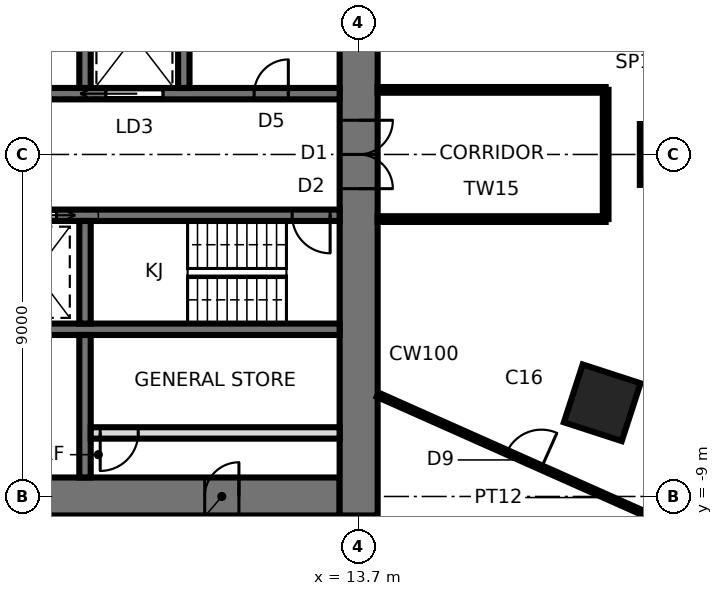
"""IFC4 building model, lengths in metres.
Left out: names, types, materials, properties, quantities, classifications, styles, units other than length and angle.
Written with IfcOpenShell. Run it as: python <this file> out.ifc"""

import sys

from ifc_helpers import new_model, si_unit, direction, frame, frame_2d, origin, origin_2d, place, context, subcontext, project, spatial, rectangle, extrude, element, fill, save


model = new_model("IFC4")
c1 = context("Model", 3, precision=1e-05, world=origin(), true_north=direction((0.0, 1.0)))
c2 = subcontext(c1, "Body", "Model", "MODEL_VIEW")
j1 = project(units=[si_unit("LENGTHUNIT", "METRE"), si_unit("PLANEANGLEUNIT", "RADIAN")], contexts=[c1])
p1 = place(None, origin())
s1 = spatial("IfcSite", under=j1, at=p1, CompositionType="ELEMENT")
p2 = place(p1, origin())
s2 = spatial("IfcBuilding", under=s1, at=p2, CompositionType="ELEMENT")
p3 = place(p2, frame((0.0, 0.0, 154.8)))
s3 = spatial("IfcBuildingStorey", under=s2, at=p3, CompositionType="ELEMENT", Elevation=154.8)
for number, where, z_axis, x_axis in (
    (1, (21.9, 0.0, 0.0), (0.0, 0.0, 1.0), (1.0, 0.0, 0.0)),
    (2, (20.109, -6.534, 0.0), (0.0, 0.0, 1.0), (0.951, -0.309, 0.0)),
):
    element("IfcColumn", number, at=place(p3, frame(where, z_axis=z_axis, x_axis=x_axis)), inside=s3, PredefinedType="COLUMN", context=c2, shape_type="SweptSolid", body=[
        extrude(rectangle(XDim=1.6, YDim=1.6, at=origin_2d()), origin(), (0.0, 0.0, 1.0), 3.9),
    ])
p4 = place(p3, frame((-13.2, -9.0, 0.0), z_axis=(0.0, 0.0, 1.0), x_axis=(1.0, 0.0, 0.0)))
e3 = element("IfcWall", 3, at=p4, inside=s3, PredefinedType="SHEAR", context=c2, shape_type="SweptSolid", body=[
    extrude(rectangle(XDim=26.4, YDim=1.0, at=frame_2d((13.2, 0.0))), origin(), (0.0, 0.0, 1.0), 3.9),
])
p5 = place(p4, frame((2.65, 0.0, 0.0)))
e4 = element("IfcOpeningElement", 4, at=p5, cuts=e3, PredefinedType="OPENING", context=c2, shape_type="SweptSolid", body=[
    extrude(rectangle(XDim=0.9, YDim=2.1, at=frame_2d((0.45, 1.05))), frame((0.0, 0.51, 0.0), z_axis=(0.0, -1.0, 0.0), x_axis=(1.0, 0.0, 0.0)), (0.0, 0.0, 1.0), 1.02),
])
p6 = place(p4, frame((9.5, 0.0, 0.0)))
e5 = element("IfcOpeningElement", 5, at=p6, cuts=e3, PredefinedType="OPENING", context=c2, shape_type="SweptSolid", body=[
    extrude(rectangle(XDim=0.9, YDim=2.1, at=frame_2d((0.45, 1.05))), frame((0.0, 0.51, 0.0), z_axis=(0.0, -1.0, 0.0), x_axis=(1.0, 0.0, 0.0)), (0.0, 0.0, 1.0), 1.02),
])
p7 = place(p4, frame((16.0, 0.0, 0.0)))
e6 = element("IfcOpeningElement", 6, at=p7, cuts=e3, PredefinedType="OPENING", context=c2, shape_type="SweptSolid", body=[
    extrude(rectangle(XDim=0.9, YDim=2.1, at=frame_2d((0.45, 1.05))), frame((0.0, 0.51, 0.0), z_axis=(0.0, -1.0, 0.0), x_axis=(1.0, 0.0, 0.0)), (0.0, 0.0, 1.0), 1.02),
])
p8 = place(p4, frame((22.85, 0.0, 0.0)))
e7 = element("IfcOpeningElement", 7, at=p8, cuts=e3, PredefinedType="OPENING", context=c2, shape_type="SweptSolid", body=[
    extrude(rectangle(XDim=0.9, YDim=2.1, at=frame_2d((0.45, 1.05))), frame((0.0, 0.51, 0.0), z_axis=(0.0, -1.0, 0.0), x_axis=(1.0, 0.0, 0.0)), (0.0, 0.0, 1.0), 1.02),
])
p9 = place(p3, frame((13.7, -9.5, 0.0), z_axis=(0.0, 0.0, 1.0), x_axis=(0.0, 1.0, 0.0)))
e8 = element("IfcWall", 8, at=p9, inside=s3, PredefinedType="SHEAR", context=c2, shape_type="SweptSolid", body=[
    extrude(rectangle(XDim=19.0, YDim=1.0, at=frame_2d((9.5, 0.0))), origin(), (0.0, 0.0, 1.0), 3.9),
])
p10 = place(p9, frame((8.6, 0.0, 0.0)))
e9 = element("IfcOpeningElement", 9, at=p10, cuts=e8, PredefinedType="OPENING", context=c2, shape_type="SweptSolid", body=[
    extrude(rectangle(XDim=1.8, YDim=2.4, at=frame_2d((0.9, 1.2))), frame((0.0, 0.51, 0.0), z_axis=(0.0, -1.0, 0.0), x_axis=(1.0, 0.0, 0.0)), (0.0, 0.0, 1.0), 1.02),
])
p11 = place(p3, frame((-13.2, 1.6, 0.0), z_axis=(0.0, 0.0, 1.0), x_axis=(1.0, 0.0, 0.0)))
e10 = element("IfcWall", 10, at=p11, inside=s3, PredefinedType="SHEAR", context=c2, shape_type="SweptSolid", body=[
    extrude(rectangle(XDim=26.4, YDim=0.3, at=frame_2d((13.2, 0.0))), origin(), (0.0, 0.0, 1.0), 3.9),
])
p12 = place(p11, frame((0.25, 0.0, 0.0)))
e11 = element("IfcOpeningElement", 11, at=p12, cuts=e10, PredefinedType="OPENING", context=c2, shape_type="SweptSolid", body=[
    extrude(rectangle(XDim=1.0, YDim=2.1, at=frame_2d((0.5, 1.05))), frame((0.0, 0.16, 0.0), z_axis=(0.0, -1.0, 0.0), x_axis=(1.0, 0.0, 0.0)), (0.0, 0.0, 1.0), 0.32),
])
p13 = place(p11, frame((20.25, 0.0, 0.0)))
e12 = element("IfcOpeningElement", 12, at=p13, cuts=e10, PredefinedType="OPENING", context=c2, shape_type="SweptSolid", body=[
    extrude(rectangle(XDim=1.5, YDim=2.4, at=frame_2d((0.75, 1.2))), frame((0.0, 0.16, 0.0), z_axis=(0.0, -1.0, 0.0), x_axis=(1.0, 0.0, 0.0)), (0.0, 0.0, 1.0), 0.32),
])
p14 = place(p11, frame((7.55, 0.0, 0.0)))
e13 = element("IfcOpeningElement", 13, at=p14, cuts=e10, PredefinedType="OPENING", context=c2, shape_type="SweptSolid", body=[
    extrude(rectangle(XDim=0.9, YDim=2.1, at=frame_2d((0.45, 1.05))), frame((0.0, 0.16, 0.0), z_axis=(0.0, -1.0, 0.0), x_axis=(1.0, 0.0, 0.0)), (0.0, 0.0, 1.0), 0.32),
])
p15 = place(p11, frame((10.15, 0.0, 0.0)))
e14 = element("IfcOpeningElement", 14, at=p15, cuts=e10, PredefinedType="OPENING", context=c2, shape_type="SweptSolid", body=[
    extrude(rectangle(XDim=0.9, YDim=2.1, at=frame_2d((0.45, 1.05))), frame((0.0, 0.16, 0.0), z_axis=(0.0, -1.0, 0.0), x_axis=(1.0, 0.0, 0.0)), (0.0, 0.0, 1.0), 0.32),
])
p16 = place(p11, frame((12.75, 0.0, 0.0)))
e15 = element("IfcOpeningElement", 15, at=p16, cuts=e10, PredefinedType="OPENING", context=c2, shape_type="SweptSolid", body=[
    extrude(rectangle(XDim=0.9, YDim=2.1, at=frame_2d((0.45, 1.05))), frame((0.0, 0.16, 0.0), z_axis=(0.0, -1.0, 0.0), x_axis=(1.0, 0.0, 0.0)), (0.0, 0.0, 1.0), 0.32),
])
p17 = place(p11, frame((24.15, 0.0, 0.0)))
e16 = element("IfcOpeningElement", 16, at=p17, cuts=e10, PredefinedType="OPENING", context=c2, shape_type="SweptSolid", body=[
    extrude(rectangle(XDim=0.9, YDim=2.1, at=frame_2d((0.45, 1.05))), frame((0.0, 0.16, 0.0), z_axis=(0.0, -1.0, 0.0), x_axis=(1.0, 0.0, 0.0)), (0.0, 0.0, 1.0), 0.32),
])
p18 = place(p3, frame((-13.2, -1.6, 0.0), z_axis=(0.0, 0.0, 1.0), x_axis=(1.0, 0.0, 0.0)))
e17 = element("IfcWall", 17, at=p18, inside=s3, PredefinedType="SHEAR", context=c2, shape_type="SweptSolid", body=[
    extrude(rectangle(XDim=26.4, YDim=0.3, at=frame_2d((13.2, 0.0))), origin(), (0.0, 0.0, 1.0), 3.9),
])
p19 = place(p18, frame((25.15, 0.0, 0.0)))
e18 = element("IfcOpeningElement", 18, at=p19, cuts=e17, PredefinedType="OPENING", context=c2, shape_type="SweptSolid", body=[
    extrude(rectangle(XDim=1.0, YDim=2.1, at=frame_2d((0.5, 1.05))), frame((0.0, 0.16, 0.0), z_axis=(0.0, -1.0, 0.0), x_axis=(1.0, 0.0, 0.0)), (0.0, 0.0, 1.0), 0.32),
])
p20 = place(p18, frame((7.45, 0.0, 0.0)))
e19 = element("IfcOpeningElement", 19, at=p20, cuts=e17, PredefinedType="OPENING", context=c2, shape_type="SweptSolid", body=[
    extrude(rectangle(XDim=1.1, YDim=2.3, at=frame_2d((0.55, 1.15))), frame((0.0, 0.16, 0.0), z_axis=(0.0, -1.0, 0.0), x_axis=(1.0, 0.0, 0.0)), (0.0, 0.0, 1.0), 0.32),
])
p21 = place(p18, frame((10.05, 0.0, 0.0)))
e20 = element("IfcOpeningElement", 20, at=p21, cuts=e17, PredefinedType="OPENING", context=c2, shape_type="SweptSolid", body=[
    extrude(rectangle(XDim=1.1, YDim=2.3, at=frame_2d((0.55, 1.15))), frame((0.0, 0.16, 0.0), z_axis=(0.0, -1.0, 0.0), x_axis=(1.0, 0.0, 0.0)), (0.0, 0.0, 1.0), 0.32),
])
p22 = place(p18, frame((12.65, 0.0, 0.0)))
e21 = element("IfcOpeningElement", 21, at=p22, cuts=e17, PredefinedType="OPENING", context=c2, shape_type="SweptSolid", body=[
    extrude(rectangle(XDim=1.1, YDim=2.3, at=frame_2d((0.55, 1.15))), frame((0.0, 0.16, 0.0), z_axis=(0.0, -1.0, 0.0), x_axis=(1.0, 0.0, 0.0)), (0.0, 0.0, 1.0), 0.32),
])
p23 = place(p18, frame((15.25, 0.0, 0.0)))
e22 = element("IfcOpeningElement", 22, at=p23, cuts=e17, PredefinedType="OPENING", context=c2, shape_type="SweptSolid", body=[
    extrude(rectangle(XDim=1.1, YDim=2.3, at=frame_2d((0.55, 1.15))), frame((0.0, 0.16, 0.0), z_axis=(0.0, -1.0, 0.0), x_axis=(1.0, 0.0, 0.0)), (0.0, 0.0, 1.0), 0.32),
])
p24 = place(p18, frame((17.85, 0.0, 0.0)))
e23 = element("IfcOpeningElement", 23, at=p24, cuts=e17, PredefinedType="OPENING", context=c2, shape_type="SweptSolid", body=[
    extrude(rectangle(XDim=1.1, YDim=2.3, at=frame_2d((0.55, 1.15))), frame((0.0, 0.16, 0.0), z_axis=(0.0, -1.0, 0.0), x_axis=(1.0, 0.0, 0.0)), (0.0, 0.0, 1.0), 0.32),
])
p25 = place(p18, frame((5.55, 0.0, 0.0)))
e24 = element("IfcOpeningElement", 24, at=p25, cuts=e17, PredefinedType="OPENING", context=c2, shape_type="SweptSolid", body=[
    extrude(rectangle(XDim=0.9, YDim=2.1, at=frame_2d((0.45, 1.05))), frame((0.0, 0.16, 0.0), z_axis=(0.0, -1.0, 0.0), x_axis=(1.0, 0.0, 0.0)), (0.0, 0.0, 1.0), 0.32),
])
p26 = place(p3, frame((-13.2, -4.6, 0.0), z_axis=(0.0, 0.0, 1.0), x_axis=(1.0, 0.0, 0.0)))
e25 = element("IfcWall", 25, at=p26, inside=s3, PredefinedType="SHEAR", context=c2, shape_type="SweptSolid", body=[
    extrude(rectangle(XDim=26.4, YDim=0.3, at=frame_2d((13.2, 0.0))), origin(), (0.0, 0.0, 1.0), 3.9),
])
for number, where, z_axis, x_axis in (
    (26, (6.5, 1.75, 0.0), (0.0, 0.0, 1.0), (0.0, 1.0, 0.0)),
    (27, (6.5, -1.75, 0.0), (0.0, 0.0, 1.0), (0.0, -1.0, 0.0)),
):
    element("IfcWall", number, at=place(p3, frame(where, z_axis=z_axis, x_axis=x_axis)), inside=s3, PredefinedType="SHEAR", context=c2, shape_type="SweptSolid", body=[
        extrude(rectangle(XDim=2.7, YDim=0.3, at=frame_2d((1.35, 0.0))), origin(), (0.0, 0.0, 1.0), 3.9),
    ])
p27 = place(p3, frame((6.5, -4.75, 0.0), z_axis=(0.0, 0.0, 1.0), x_axis=(0.0, -1.0, 0.0)))
e28 = element("IfcWall", 28, at=p27, inside=s3, PredefinedType="SHEAR", context=c2, shape_type="SweptSolid", body=[
    extrude(rectangle(XDim=3.75, YDim=0.3, at=frame_2d((1.875, 0.0))), origin(), (0.0, 0.0, 1.0), 3.9),
])
p28 = place(p3, frame((9.1, 1.75, 0.0), z_axis=(0.0, 0.0, 1.0), x_axis=(0.0, 1.0, 0.0)))
e29 = element("IfcWall", 29, at=p28, inside=s3, PredefinedType="SHEAR", context=c2, shape_type="SweptSolid", body=[
    extrude(rectangle(XDim=2.7, YDim=0.3, at=frame_2d((1.35, 0.0))), origin(), (0.0, 0.0, 1.0), 3.9),
])
p29 = place(p3, frame((6.65, -7.328, 0.0), z_axis=(0.0, 0.0, 1.0), x_axis=(1.0, 0.0, 0.0)))
e30 = element("IfcWall", 30, at=p29, inside=s3, PredefinedType="PARTITIONING", context=c2, shape_type="SweptSolid", body=[
    extrude(rectangle(XDim=6.55, YDim=0.3, at=frame_2d((3.275, 0.0))), origin(), (0.0, 0.0, 1.0), 3.74),
])
p30 = place(p29, frame((0.25, 0.0, 0.0)))
e31 = element("IfcOpeningElement", 31, at=p30, cuts=e30, PredefinedType="OPENING", context=c2, shape_type="SweptSolid", body=[
    extrude(rectangle(XDim=1.0, YDim=2.4, at=frame_2d((0.5, 1.2))), frame((0.0, 0.16, 0.0), z_axis=(0.0, -1.0, 0.0), x_axis=(1.0, 0.0, 0.0)), (0.0, 0.0, 1.0), 0.32),
])
p31 = place(p3, frame((14.2, -6.322, 0.0), z_axis=(0.0, 0.0, 1.0), x_axis=(0.913546486883, -0.406734331357, 0.0)))
e32 = element("IfcWall", 32, at=p31, inside=s3, PredefinedType="PARTITIONING", context=c2, shape_type="SweptSolid", body=[
    extrude(rectangle(XDim=8.438, YDim=0.12, at=frame_2d((4.219, 0.0))), origin(), (0.0, 0.0, 1.0), 3.74),
])
p32 = place(p31, frame((3.719, 0.0, 0.0)))
e33 = element("IfcOpeningElement", 33, at=p32, cuts=e32, PredefinedType="OPENING", context=c2, shape_type="SweptSolid", body=[
    extrude(rectangle(XDim=1.0, YDim=2.4, at=frame_2d((0.5, 1.2))), frame((0.0, 0.07, 0.0), z_axis=(0.0, -1.0, 0.0), x_axis=(1.0, 0.0, 0.0)), (0.0, 0.0, 1.0), 0.14),
])
p33 = place(p3, frame((14.2, -1.7, 0.0), z_axis=(0.0, 0.0, 1.0), x_axis=(1.0, 0.0, 0.0)))
e34 = element("IfcWall", 34, at=p33, inside=s3, PredefinedType="PARTITIONING", context=c2, shape_type="SweptSolid", body=[
    extrude(rectangle(XDim=6.0, YDim=0.15, at=frame_2d((3.0, 0.0))), origin(), (0.0, 0.0, 1.0), 3.74),
])
p34 = place(p3, frame((20.2, -1.7, 0.0), z_axis=(0.0, 0.0, 1.0), x_axis=(0.0, 1.0, 0.0)))
e35 = element("IfcWall", 35, at=p34, inside=s3, PredefinedType="PARTITIONING", context=c2, shape_type="SweptSolid", body=[
    extrude(rectangle(XDim=3.4, YDim=0.15, at=frame_2d((1.7, 0.0))), origin(), (0.0, 0.0, 1.0), 3.74),
])
p35 = place(p3, frame((20.2, 1.7, 0.0), z_axis=(0.0, 0.0, 1.0), x_axis=(-1.0, 0.0, 0.0)))
e36 = element("IfcWall", 36, at=p35, inside=s3, PredefinedType="PARTITIONING", context=c2, shape_type="SweptSolid", body=[
    extrude(rectangle(XDim=6.0, YDim=0.15, at=frame_2d((3.0, 0.0))), origin(), (0.0, 0.0, 1.0), 3.74),
])
p36 = place(p10, frame((1.8, 0.0, 0.0), z_axis=(0.0, 0.0, 1.0), x_axis=(-1.0, 0.0, 0.0)))
e37 = element("IfcDoor", 37, at=p36, inside=s3, OperationType="DOUBLE_DOOR_SINGLE_SWING", PredefinedType="DOOR", context=c2, shape_type="SweptSolid", body=[
    extrude(rectangle(XDim=1.72, YDim=2.36, at=frame_2d((0.9, 1.18))), frame((0.0, 0.025, 0.0), z_axis=(0.0, -1.0, 0.0), x_axis=(1.0, 0.0, 0.0)), (0.0, 0.0, 1.0), 0.05),
    extrude(rectangle(XDim=0.04, YDim=2.4, at=frame_2d((1.78, 1.2))), frame((0.0, 0.25, 0.0), z_axis=(0.0, -1.0, 0.0), x_axis=(1.0, 0.0, 0.0)), (0.0, 0.0, 1.0), 0.5),
    extrude(rectangle(XDim=0.04, YDim=2.4, at=frame_2d((0.02, 1.2))), frame((0.0, 0.25, 0.0), z_axis=(0.0, -1.0, 0.0), x_axis=(1.0, 0.0, 0.0)), (0.0, 0.0, 1.0), 0.5),
    extrude(rectangle(XDim=1.72, YDim=0.04, at=frame_2d((0.9, 2.38))), frame((0.0, 0.25, 0.0), z_axis=(0.0, -1.0, 0.0), x_axis=(1.0, 0.0, 0.0)), (0.0, 0.0, 1.0), 0.5),
])
fill(e9, e37)
p37 = place(p19, frame((1.0, 0.0, 0.0), z_axis=(0.0, 0.0, 1.0), x_axis=(-1.0, 0.0, 0.0)))
e38 = element("IfcDoor", 38, at=p37, inside=s3, OperationType="SINGLE_SWING_LEFT", PredefinedType="DOOR", context=c2, shape_type="SweptSolid", body=[
    extrude(rectangle(XDim=1.0, YDim=2.1, at=frame_2d((0.5, 1.05))), frame((0.0, 0.025, 0.0), z_axis=(0.0, -1.0, 0.0), x_axis=(1.0, 0.0, 0.0)), (0.0, 0.0, 1.0), 0.05),
])
fill(e18, e38)
p38 = place(p13, origin())
e39 = element("IfcDoor", 39, at=p38, inside=s3, OperationType="SLIDING_TO_LEFT", PredefinedType="DOOR", context=c2, shape_type="SweptSolid", body=[
    extrude(rectangle(XDim=1.5, YDim=2.4, at=frame_2d((0.75, 1.2))), frame((0.0, 0.025, 0.0), z_axis=(0.0, -1.0, 0.0), x_axis=(1.0, 0.0, 0.0)), (0.0, 0.0, 1.0), 0.05),
])
fill(e12, e39)
p39 = place(p24, frame((1.1, 0.0, 0.0), z_axis=(0.0, 0.0, 1.0), x_axis=(-1.0, 0.0, 0.0)))
e40 = element("IfcDoor", 40, at=p39, inside=s3, OperationType="SLIDING_TO_LEFT", PredefinedType="DOOR", context=c2, shape_type="SweptSolid", body=[
    extrude(rectangle(XDim=1.1, YDim=2.3, at=frame_2d((0.55, 1.15))), frame((0.0, 0.025, 0.0), z_axis=(0.0, -1.0, 0.0), x_axis=(1.0, 0.0, 0.0)), (0.0, 0.0, 1.0), 0.05),
])
fill(e23, e40)
p40 = place(p17, origin())
e41 = element("IfcDoor", 41, at=p40, inside=s3, OperationType="SINGLE_SWING_RIGHT", PredefinedType="DOOR", context=c2, shape_type="SweptSolid", body=[
    extrude(rectangle(XDim=0.9, YDim=2.1, at=frame_2d((0.45, 1.05))), frame((0.0, 0.025, 0.0), z_axis=(0.0, -1.0, 0.0), x_axis=(1.0, 0.0, 0.0)), (0.0, 0.0, 1.0), 0.05),
])
fill(e16, e41)
p41 = place(p8, origin())
e42 = element("IfcDoor", 42, at=p41, inside=s3, OperationType="SINGLE_SWING_RIGHT", PredefinedType="DOOR", context=c2, shape_type="SweptSolid", body=[
    extrude(rectangle(XDim=0.82, YDim=2.06, at=frame_2d((0.45, 1.03))), frame((0.0, 0.025, 0.0), z_axis=(0.0, -1.0, 0.0), x_axis=(1.0, 0.0, 0.0)), (0.0, 0.0, 1.0), 0.05),
    extrude(rectangle(XDim=0.04, YDim=2.1, at=frame_2d((0.02, 1.05))), frame((0.0, 0.25, 0.0), z_axis=(0.0, -1.0, 0.0), x_axis=(1.0, 0.0, 0.0)), (0.0, 0.0, 1.0), 0.5),
    extrude(rectangle(XDim=0.04, YDim=2.1, at=frame_2d((0.88, 1.05))), frame((0.0, 0.25, 0.0), z_axis=(0.0, -1.0, 0.0), x_axis=(1.0, 0.0, 0.0)), (0.0, 0.0, 1.0), 0.5),
    extrude(rectangle(XDim=0.82, YDim=0.04, at=frame_2d((0.45, 2.08))), frame((0.0, 0.25, 0.0), z_axis=(0.0, -1.0, 0.0), x_axis=(1.0, 0.0, 0.0)), (0.0, 0.0, 1.0), 0.5),
])
fill(e7, e42)
p42 = place(p30, frame((1.0, 0.0, 0.0), z_axis=(0.0, 0.0, 1.0), x_axis=(-1.0, 0.0, 0.0)))
e43 = element("IfcDoor", 43, at=p42, inside=s3, OperationType="SINGLE_SWING_RIGHT", PredefinedType="DOOR", context=c2, shape_type="SweptSolid", body=[
    extrude(rectangle(XDim=1.0, YDim=2.4, at=frame_2d((0.5, 1.2))), frame((0.0, 0.025, 0.0), z_axis=(0.0, -1.0, 0.0), x_axis=(1.0, 0.0, 0.0)), (0.0, 0.0, 1.0), 0.05),
])
fill(e31, e43)
p43 = place(p32, origin())
e44 = element("IfcDoor", 44, at=p43, inside=s3, OperationType="SINGLE_SWING_RIGHT", PredefinedType="DOOR", context=c2, shape_type="SweptSolid", body=[
    extrude(rectangle(XDim=1.0, YDim=2.4, at=frame_2d((0.5, 1.2))), frame((0.0, 0.025, 0.0), z_axis=(0.0, -1.0, 0.0), x_axis=(1.0, 0.0, 0.0)), (0.0, 0.0, 1.0), 0.05),
])
fill(e33, e44)
save(model, sys.argv[1])
